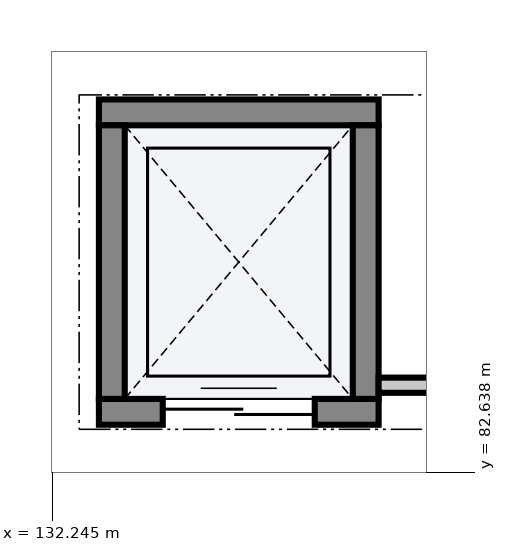
"""IFC4 building model, lengths in metres.
Left out: names, types, materials, properties, quantities, classifications, styles, units other than length and angle.
Written with IfcOpenShell. Run it as: python <this file> out.ifc"""

import sys

from ifc_helpers import new_model, si_unit, direction, frame, frame_2d, origin, place, context, subcontext, project, spatial, rectangle, extrude, element, fill, save


model = new_model("IFC4")
c1 = context("Model", 3, precision=1e-05, world=origin(), true_north=direction((0.0, 1.0)))
c2 = subcontext(c1, "Body", "Model", "MODEL_VIEW")
j1 = project(units=[si_unit("LENGTHUNIT", "METRE"), si_unit("PLANEANGLEUNIT", "RADIAN")], contexts=[c1])
p1 = place(None, origin())
s1 = spatial("IfcSite", under=j1, at=p1, CompositionType="ELEMENT")
p2 = place(p1, origin())
s2 = spatial("IfcBuilding", under=s1, at=p2, CompositionType="ELEMENT")
p3 = place(p2, frame((0.0, 0.0, 15.0)))
s3 = spatial("IfcBuildingStorey", under=s2, at=p3, CompositionType="ELEMENT", Elevation=15.0)
p4 = place(p3, frame((132.86, 83.43, 0.0), z_axis=(0.0, 0.0, 1.0), x_axis=(1.0, 0.0, 0.0)))
e1 = element("IfcWall", 1, at=p4, inside=s3, PredefinedType="SHEAR", context=c2, shape_type="SweptSolid", body=[
    extrude(rectangle(XDim=3.68, YDim=0.34, at=frame_2d((1.84, 0.0))), origin(), (0.0, 0.0, 1.0), 4.52),
])
p5 = place(p4, frame((0.84, 0.0, 0.0)))
e2 = element("IfcOpeningElement", 2, at=p5, cuts=e1, PredefinedType="OPENING", context=c2, shape_type="SweptSolid", body=[
    extrude(rectangle(XDim=2.0, YDim=2.4, at=frame_2d((1.0, 1.2))), frame((0.0, 0.182, 0.0), z_axis=(0.0, -1.0, 0.0), x_axis=(1.0, 0.0, 0.0)), (0.0, 0.0, 1.0), 0.364),
])
p6 = place(p3, frame((132.86, 87.37, 0.0), z_axis=(0.0, 0.0, 1.0), x_axis=(1.0, 0.0, 0.0)))
e3 = element("IfcWall", 3, at=p6, inside=s3, PredefinedType="SHEAR", context=c2, shape_type="SweptSolid", body=[
    extrude(rectangle(XDim=3.68, YDim=0.34, at=frame_2d((1.84, 0.0))), origin(), (0.0, 0.0, 1.0), 4.52),
])
for number, where, z_axis, x_axis in (
    (4, (133.03, 83.6, 0.0), (0.0, 0.0, 1.0), (0.0, 1.0, 0.0)),
    (5, (136.37, 83.6, 0.0), (0.0, 0.0, 1.0), (0.0, 1.0, 0.0)),
):
    element("IfcWall", number, at=place(p3, frame(where, z_axis=z_axis, x_axis=x_axis)), inside=s3, PredefinedType="SHEAR", context=c2, shape_type="SweptSolid", body=[
        extrude(rectangle(XDim=3.6, YDim=0.34, at=frame_2d((1.8, 0.0))), origin(), (0.0, 0.0, 1.0), 4.52),
    ])
p7 = place(p3, frame((141.86, 83.78, 0.0), z_axis=(0.0, 0.0, 1.0), x_axis=(-1.0, 0.0, 0.0)))
e6 = element("IfcWall", 6, at=p7, inside=s3, PredefinedType="PARTITIONING", context=c2, shape_type="SweptSolid", body=[
    extrude(rectangle(XDim=5.32, YDim=0.2, at=frame_2d((2.66, 0.0))), origin(), (0.0, 0.0, 1.0), 3.46),
])
p8 = place(p5, origin())
e7 = element("IfcDoor", 7, at=p8, inside=s3, OperationType="DOUBLE_DOOR_SLIDING", PredefinedType="DOOR", context=c2, shape_type="SweptSolid", body=[
    extrude(rectangle(XDim=2.0, YDim=2.4, at=frame_2d((1.0, 1.2))), frame((0.0, 0.025, 0.0), z_axis=(0.0, -1.0, 0.0), x_axis=(1.0, 0.0, 0.0)), (0.0, 0.0, 1.0), 0.05),
])
fill(e2, e7)
save(model, sys.argv[1])
